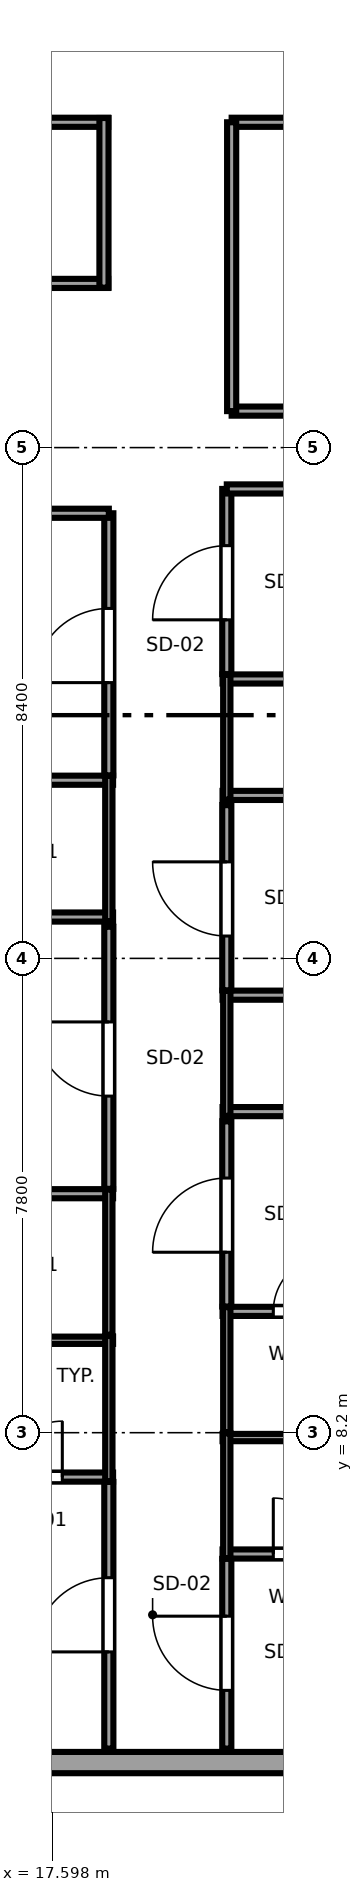
"""IFC4 building model, lengths in metres.
Left out: names, types, materials, properties, quantities, classifications, styles, units other than length and angle.
Written with IfcOpenShell. Run it as: python <this file> out.ifc"""

import sys

from ifc_helpers import new_model, si_unit, direction, frame, frame_2d, origin, place, context, subcontext, project, spatial, rectangle, extrude, source, transform, mapped, element, fill, save


model = new_model("IFC4")
c1 = context("Model", 3, precision=1e-05, world=origin(), true_north=direction((0.0, 1.0)))
c2 = subcontext(c1, "Body", "Model", "MODEL_VIEW")
j1 = project(units=[si_unit("LENGTHUNIT", "METRE"), si_unit("PLANEANGLEUNIT", "RADIAN")], contexts=[c1])
p1 = place(None, origin())
s1 = spatial("IfcSite", under=j1, at=p1, CompositionType="ELEMENT")
p2 = place(p1, origin())
s2 = spatial("IfcBuilding", under=s1, at=p2, CompositionType="ELEMENT")
p3 = place(p2, frame((0.0, 0.0, 238.1)))
s3 = spatial("IfcBuildingStorey", under=s2, at=p3, CompositionType="ELEMENT", Elevation=238.1)
p4 = place(p3, frame((7.017, 2.775, 0.0), z_axis=(0.0, 0.0, 1.0), x_axis=(1.0, 0.0, 0.0)))
e1 = element("IfcWall", 1, at=p4, inside=s3, PredefinedType="SOLIDWALL", context=c2, shape_type="SweptSolid", body=[
    extrude(rectangle(XDim=28.366, YDim=0.35, at=frame_2d((14.183, 0.0))), origin(), (0.0, 0.0, 1.0), 3.29),
])
p5 = place(p4, frame((1.514, 0.0, 0.68)))
e2 = element("IfcOpeningElement", 2, at=p5, cuts=e1, PredefinedType="OPENING", context=c2, shape_type="SweptSolid", body=[
    extrude(rectangle(XDim=2.7, YDim=1.95, at=frame_2d((1.35, 0.975))), frame((0.0, 0.185, 0.0), z_axis=(0.0, -1.0, 0.0), x_axis=(1.0, 0.0, 0.0)), (0.0, 0.0, 1.0), 0.37),
])
p6 = place(p4, frame((15.647, 0.0, 0.68)))
e3 = element("IfcOpeningElement", 3, at=p6, cuts=e1, PredefinedType="OPENING", context=c2, shape_type="SweptSolid", body=[
    extrude(rectangle(XDim=2.7, YDim=1.95, at=frame_2d((1.35, 0.975))), frame((0.0, 0.185, 0.0), z_axis=(0.0, -1.0, 0.0), x_axis=(1.0, 0.0, 0.0)), (0.0, 0.0, 1.0), 0.37),
])
p7 = place(p4, frame((24.152, 0.0, 0.68)))
e4 = element("IfcOpeningElement", 4, at=p7, cuts=e1, PredefinedType="OPENING", context=c2, shape_type="SweptSolid", body=[
    extrude(rectangle(XDim=2.7, YDim=1.95, at=frame_2d((1.35, 0.975))), frame((0.0, 0.185, 0.0), z_axis=(0.0, -1.0, 0.0), x_axis=(1.0, 0.0, 0.0)), (0.0, 0.0, 1.0), 0.37),
])
p8 = place(p3, frame((16.01, 7.47, 0.0), z_axis=(0.0, 0.0, 1.0), x_axis=(1.0, 0.0, 0.0)))
e5 = element("IfcWall", 5, at=p8, inside=s3, PredefinedType="PARTITIONING", context=c2, shape_type="SweptSolid", body=[
    extrude(rectangle(XDim=2.59, YDim=0.15, at=frame_2d((1.295, 0.0))), origin(), (0.0, 0.0, 1.0), 3.29),
])
p9 = place(p8, frame((0.835, 0.0, 0.0)))
e6 = element("IfcOpeningElement", 6, at=p9, cuts=e5, PredefinedType="OPENING", context=c2, shape_type="SweptSolid", body=[
    extrude(rectangle(XDim=0.92, YDim=2.01, at=frame_2d((0.46, 1.005))), frame((0.0, 0.085, 0.0), z_axis=(0.0, -1.0, 0.0), x_axis=(1.0, 0.0, 0.0)), (0.0, 0.0, 1.0), 0.17),
])
p10 = place(p3, frame((16.01, 9.72, 0.0), z_axis=(0.0, 0.0, 1.0), x_axis=(1.0, 0.0, 0.0)))
e7 = element("IfcWall", 7, at=p10, inside=s3, PredefinedType="PLUMBINGWALL", context=c2, shape_type="SweptSolid", body=[
    extrude(rectangle(XDim=2.59, YDim=0.12, at=frame_2d((1.295, 0.0))), origin(), (0.0, 0.0, 1.0), 3.29),
])
p11 = place(p3, frame((18.53, 7.4, 0.0), z_axis=(0.0, 0.0, 1.0), x_axis=(0.0, 1.0, 0.0)))
e8 = element("IfcWall", 8, at=p11, inside=s3, PredefinedType="PLUMBINGWALL", context=c2, shape_type="SweptSolid", body=[
    extrude(rectangle(XDim=2.39, YDim=0.12, at=frame_2d((1.195, 0.0))), origin(), (0.0, 0.0, 1.0), 3.29),
])
p12 = place(p3, frame((16.01, 12.13, 0.0), z_axis=(0.0, 0.0, 1.0), x_axis=(1.0, 0.0, 0.0)))
e9 = element("IfcWall", 9, at=p12, inside=s3, PredefinedType="PARTITIONING", context=c2, shape_type="SweptSolid", body=[
    extrude(rectangle(XDim=2.59, YDim=0.15, at=frame_2d((1.295, 0.0))), origin(), (0.0, 0.0, 1.0), 3.29),
])
p13 = place(p3, frame((18.53, 9.81, 0.0), z_axis=(0.0, 0.0, 1.0), x_axis=(0.0, 1.0, 0.0)))
e10 = element("IfcWall", 10, at=p13, inside=s3, PredefinedType="PLUMBINGWALL", context=c2, shape_type="SweptSolid", body=[
    extrude(rectangle(XDim=2.39, YDim=0.12, at=frame_2d((1.195, 0.0))), origin(), (0.0, 0.0, 1.0), 3.29),
])
p14 = place(p3, frame((3.005, 16.68, 0.0), z_axis=(0.0, 0.0, 1.0), x_axis=(1.0, 0.0, 0.0)))
e11 = element("IfcWall", 11, at=p14, inside=s3, PredefinedType="PARTITIONING", context=c2, shape_type="SweptSolid", body=[
    extrude(rectangle(XDim=15.595, YDim=0.15, at=frame_2d((7.798, 0.0))), origin(), (0.0, 0.0, 1.0), 3.29),
])
p15 = place(p3, frame((16.01, 18.93, 0.0), z_axis=(0.0, 0.0, 1.0), x_axis=(1.0, 0.0, 0.0)))
e12 = element("IfcWall", 12, at=p15, inside=s3, PredefinedType="PARTITIONING", context=c2, shape_type="SweptSolid", body=[
    extrude(rectangle(XDim=2.59, YDim=0.15, at=frame_2d((1.295, 0.0))), origin(), (0.0, 0.0, 1.0), 3.29),
])
p16 = place(p3, frame((18.53, 16.61, 0.0), z_axis=(0.0, 0.0, 1.0), x_axis=(0.0, 1.0, 0.0)))
e13 = element("IfcWall", 13, at=p16, inside=s3, PredefinedType="PLUMBINGWALL", context=c2, shape_type="SweptSolid", body=[
    extrude(rectangle(XDim=2.39, YDim=0.12, at=frame_2d((1.195, 0.0))), origin(), (0.0, 0.0, 1.0), 3.29),
])
p17 = place(p3, frame((20.4, 6.205, 0.0), z_axis=(0.0, 0.0, 1.0), x_axis=(1.0, 0.0, 0.0)))
e14 = element("IfcWall", 14, at=p17, inside=s3, PredefinedType="PARTITIONING", context=c2, shape_type="SweptSolid", body=[
    extrude(rectangle(XDim=2.59, YDim=0.15, at=frame_2d((1.295, 0.0))), origin(), (0.0, 0.0, 1.0), 3.29),
])
p18 = place(p17, frame((0.835, 0.0, 0.0)))
e15 = element("IfcOpeningElement", 15, at=p18, cuts=e14, PredefinedType="OPENING", context=c2, shape_type="SweptSolid", body=[
    extrude(rectangle(XDim=0.92, YDim=2.01, at=frame_2d((0.46, 1.005))), frame((0.0, 0.085, 0.0), z_axis=(0.0, -1.0, 0.0), x_axis=(1.0, 0.0, 0.0)), (0.0, 0.0, 1.0), 0.17),
])
p19 = place(p3, frame((20.4, 8.12, 0.0), z_axis=(0.0, 0.0, 1.0), x_axis=(1.0, 0.0, 0.0)))
e16 = element("IfcWall", 16, at=p19, inside=s3, PredefinedType="PLUMBINGWALL", context=c2, shape_type="SweptSolid", body=[
    extrude(rectangle(XDim=2.59, YDim=0.12, at=frame_2d((1.295, 0.0))), origin(), (0.0, 0.0, 1.0), 3.29),
])
p20 = place(p3, frame((20.47, 6.135, 0.0), z_axis=(0.0, 0.0, 1.0), x_axis=(0.0, 1.0, 0.0)))
e17 = element("IfcWall", 17, at=p20, inside=s3, PredefinedType="PLUMBINGWALL", context=c2, shape_type="SweptSolid", body=[
    extrude(rectangle(XDim=2.055, YDim=0.12, at=frame_2d((1.027, 0.0))), origin(), (0.0, 0.0, 1.0), 3.29),
])
p21 = place(p3, frame((20.4, 10.195, 0.0), z_axis=(0.0, 0.0, 1.0), x_axis=(1.0, 0.0, 0.0)))
e18 = element("IfcWall", 18, at=p21, inside=s3, PredefinedType="PARTITIONING", context=c2, shape_type="SweptSolid", body=[
    extrude(rectangle(XDim=2.59, YDim=0.15, at=frame_2d((1.295, 0.0))), origin(), (0.0, 0.0, 1.0), 3.29),
])
p22 = place(p21, frame((0.835, 0.0, 0.0)))
e19 = element("IfcOpeningElement", 19, at=p22, cuts=e18, PredefinedType="OPENING", context=c2, shape_type="SweptSolid", body=[
    extrude(rectangle(XDim=0.92, YDim=2.01, at=frame_2d((0.46, 1.005))), frame((0.0, 0.085, 0.0), z_axis=(0.0, -1.0, 0.0), x_axis=(1.0, 0.0, 0.0)), (0.0, 0.0, 1.0), 0.17),
])
p23 = place(p3, frame((20.47, 8.21, 0.0), z_axis=(0.0, 0.0, 1.0), x_axis=(0.0, 1.0, 0.0)))
e20 = element("IfcWall", 20, at=p23, inside=s3, PredefinedType="PLUMBINGWALL", context=c2, shape_type="SweptSolid", body=[
    extrude(rectangle(XDim=2.055, YDim=0.12, at=frame_2d((1.027, 0.0))), origin(), (0.0, 0.0, 1.0), 3.29),
])
p24 = place(p3, frame((20.4, 13.48, 0.0), z_axis=(0.0, 0.0, 1.0), x_axis=(1.0, 0.0, 0.0)))
e21 = element("IfcWall", 21, at=p24, inside=s3, PredefinedType="PARTITIONING", context=c2, shape_type="SweptSolid", body=[
    extrude(rectangle(XDim=18.995, YDim=0.15, at=frame_2d((9.498, 0.0))), origin(), (0.0, 0.0, 1.0), 3.29),
])
p25 = place(p3, frame((20.4, 15.395, 0.0), z_axis=(0.0, 0.0, 1.0), x_axis=(1.0, 0.0, 0.0)))
e22 = element("IfcWall", 22, at=p25, inside=s3, PredefinedType="PARTITIONING", context=c2, shape_type="SweptSolid", body=[
    extrude(rectangle(XDim=2.59, YDim=0.15, at=frame_2d((1.295, 0.0))), origin(), (0.0, 0.0, 1.0), 3.29),
])
p26 = place(p3, frame((20.47, 13.41, 0.0), z_axis=(0.0, 0.0, 1.0), x_axis=(0.0, 1.0, 0.0)))
e23 = element("IfcWall", 23, at=p26, inside=s3, PredefinedType="PLUMBINGWALL", context=c2, shape_type="SweptSolid", body=[
    extrude(rectangle(XDim=2.055, YDim=0.12, at=frame_2d((1.028, 0.0))), origin(), (0.0, 0.0, 1.0), 3.29),
])
p27 = place(p3, frame((20.4, 18.68, 0.0), z_axis=(0.0, 0.0, 1.0), x_axis=(1.0, 0.0, 0.0)))
e24 = element("IfcWall", 24, at=p27, inside=s3, PredefinedType="PARTITIONING", context=c2, shape_type="SweptSolid", body=[
    extrude(rectangle(XDim=18.995, YDim=0.15, at=frame_2d((9.498, 0.0))), origin(), (0.0, 0.0, 1.0), 3.29),
])
p28 = place(p3, frame((20.4, 20.595, 0.0), z_axis=(0.0, 0.0, 1.0), x_axis=(1.0, 0.0, 0.0)))
e25 = element("IfcWall", 25, at=p28, inside=s3, PredefinedType="PARTITIONING", context=c2, shape_type="SweptSolid", body=[
    extrude(rectangle(XDim=2.59, YDim=0.15, at=frame_2d((1.295, 0.0))), origin(), (0.0, 0.0, 1.0), 3.29),
])
p29 = place(p3, frame((20.47, 18.61, 0.0), z_axis=(0.0, 0.0, 1.0), x_axis=(0.0, 1.0, 0.0)))
e26 = element("IfcWall", 26, at=p29, inside=s3, PredefinedType="PLUMBINGWALL", context=c2, shape_type="SweptSolid", body=[
    extrude(rectangle(XDim=2.055, YDim=0.12, at=frame_2d((1.027, 0.0))), origin(), (0.0, 0.0, 1.0), 3.29),
])
p30 = place(p3, frame((18.53, 3.005, 0.0), z_axis=(0.0, 0.0, 1.0), x_axis=(0.0, 1.0, 0.0)))
e27 = element("IfcWall", 27, at=p30, inside=s3, PredefinedType="PARTITIONING", context=c2, shape_type="SweptSolid", body=[
    extrude(rectangle(XDim=4.385, YDim=0.15, at=frame_2d((2.192, 0.0))), origin(), (0.0, 0.0, 1.0), 3.29),
])
p31 = place(p30, frame((1.59, 0.0, 0.0)))
e28 = element("IfcOpeningElement", 28, at=p31, cuts=e27, PredefinedType="OPENING", context=c2, shape_type="SweptSolid", body=[
    extrude(rectangle(XDim=1.22, YDim=2.08, at=frame_2d((0.61, 1.04))), frame((0.0, 0.085, 0.0), z_axis=(0.0, -1.0, 0.0), x_axis=(1.0, 0.0, 0.0)), (0.0, 0.0, 1.0), 0.17),
])
p32 = place(p3, frame((18.53, 12.21, 0.0), z_axis=(0.0, 0.0, 1.0), x_axis=(0.0, 1.0, 0.0)))
e29 = element("IfcWall", 29, at=p32, inside=s3, PredefinedType="PARTITIONING", context=c2, shape_type="SweptSolid", body=[
    extrude(rectangle(XDim=4.31, YDim=0.15, at=frame_2d((2.155, 0.0))), origin(), (0.0, 0.0, 1.0), 3.29),
])
p33 = place(p32, frame((1.525, 0.0, 0.0)))
e30 = element("IfcOpeningElement", 30, at=p33, cuts=e29, PredefinedType="OPENING", context=c2, shape_type="SweptSolid", body=[
    extrude(rectangle(XDim=1.22, YDim=2.08, at=frame_2d((0.61, 1.04))), frame((0.0, 0.085, 0.0), z_axis=(0.0, -1.0, 0.0), x_axis=(1.0, 0.0, 0.0)), (0.0, 0.0, 1.0), 0.17),
])
p34 = place(p3, frame((18.53, 19.01, 0.0), z_axis=(0.0, 0.0, 1.0), x_axis=(0.0, 1.0, 0.0)))
e31 = element("IfcWall", 31, at=p34, inside=s3, PredefinedType="PARTITIONING", context=c2, shape_type="SweptSolid", body=[
    extrude(rectangle(XDim=4.31, YDim=0.15, at=frame_2d((2.155, 0.0))), origin(), (0.0, 0.0, 1.0), 3.29),
])
p35 = place(p34, frame((1.525, 0.0, 0.0)))
e32 = element("IfcOpeningElement", 32, at=p35, cuts=e31, PredefinedType="OPENING", context=c2, shape_type="SweptSolid", body=[
    extrude(rectangle(XDim=1.22, YDim=2.08, at=frame_2d((0.61, 1.04))), frame((0.0, 0.085, 0.0), z_axis=(0.0, -1.0, 0.0), x_axis=(1.0, 0.0, 0.0)), (0.0, 0.0, 1.0), 0.17),
])
p36 = place(p3, frame((3.005, 23.32, 0.0), z_axis=(0.0, 0.0, 1.0), x_axis=(1.0, 0.0, 0.0)))
e33 = element("IfcWall", 33, at=p36, inside=s3, PredefinedType="PARTITIONING", context=c2, shape_type="SweptSolid", body=[
    extrude(rectangle(XDim=15.525, YDim=0.15, at=frame_2d((7.763, 0.0))), origin(), (0.0, 0.0, 1.0), 3.29),
])
p37 = place(p3, frame((20.47, 3.005, 0.0), z_axis=(0.0, 0.0, 1.0), x_axis=(0.0, 1.0, 0.0)))
e34 = element("IfcWall", 34, at=p37, inside=s3, PredefinedType="PARTITIONING", context=c2, shape_type="SweptSolid", body=[
    extrude(rectangle(XDim=3.12, YDim=0.15, at=frame_2d((1.56, 0.0))), origin(), (0.0, 0.0, 1.0), 3.29),
])
p38 = place(p37, frame((0.958, 0.0, 0.0)))
e35 = element("IfcOpeningElement", 35, at=p38, cuts=e34, PredefinedType="OPENING", context=c2, shape_type="SweptSolid", body=[
    extrude(rectangle(XDim=1.22, YDim=2.08, at=frame_2d((0.61, 1.04))), frame((0.0, 0.085, 0.0), z_axis=(0.0, -1.0, 0.0), x_axis=(1.0, 0.0, 0.0)), (0.0, 0.0, 1.0), 0.17),
])
p39 = place(p3, frame((20.47, 10.275, 0.0), z_axis=(0.0, 0.0, 1.0), x_axis=(0.0, 1.0, 0.0)))
e36 = element("IfcWall", 36, at=p39, inside=s3, PredefinedType="PARTITIONING", context=c2, shape_type="SweptSolid", body=[
    extrude(rectangle(XDim=3.045, YDim=0.15, at=frame_2d((1.522, 0.0))), origin(), (0.0, 0.0, 1.0), 3.29),
])
p40 = place(p39, frame((0.893, 0.0, 0.0)))
e37 = element("IfcOpeningElement", 37, at=p40, cuts=e36, PredefinedType="OPENING", context=c2, shape_type="SweptSolid", body=[
    extrude(rectangle(XDim=1.22, YDim=2.08, at=frame_2d((0.61, 1.04))), frame((0.0, 0.085, 0.0), z_axis=(0.0, -1.0, 0.0), x_axis=(1.0, 0.0, 0.0)), (0.0, 0.0, 1.0), 0.17),
])
p41 = place(p3, frame((20.47, 15.475, 0.0), z_axis=(0.0, 0.0, 1.0), x_axis=(0.0, 1.0, 0.0)))
e38 = element("IfcWall", 38, at=p41, inside=s3, PredefinedType="PARTITIONING", context=c2, shape_type="SweptSolid", body=[
    extrude(rectangle(XDim=3.045, YDim=0.15, at=frame_2d((1.522, 0.0))), origin(), (0.0, 0.0, 1.0), 3.29),
])
p42 = place(p41, frame((0.893, 0.0, 0.0)))
e39 = element("IfcOpeningElement", 39, at=p42, cuts=e38, PredefinedType="OPENING", context=c2, shape_type="SweptSolid", body=[
    extrude(rectangle(XDim=1.22, YDim=2.08, at=frame_2d((0.61, 1.04))), frame((0.0, 0.085, 0.0), z_axis=(0.0, -1.0, 0.0), x_axis=(1.0, 0.0, 0.0)), (0.0, 0.0, 1.0), 0.17),
])
p43 = place(p3, frame((20.47, 20.675, 0.0), z_axis=(0.0, 0.0, 1.0), x_axis=(0.0, 1.0, 0.0)))
e40 = element("IfcWall", 40, at=p43, inside=s3, PredefinedType="PARTITIONING", context=c2, shape_type="SweptSolid", body=[
    extrude(rectangle(XDim=3.045, YDim=0.15, at=frame_2d((1.522, 0.0))), origin(), (0.0, 0.0, 1.0), 3.29),
])
p44 = place(p43, frame((0.893, 0.0, 0.0)))
e41 = element("IfcOpeningElement", 41, at=p44, cuts=e40, PredefinedType="OPENING", context=c2, shape_type="SweptSolid", body=[
    extrude(rectangle(XDim=1.22, YDim=2.08, at=frame_2d((0.61, 1.04))), frame((0.0, 0.085, 0.0), z_axis=(0.0, -1.0, 0.0), x_axis=(1.0, 0.0, 0.0)), (0.0, 0.0, 1.0), 0.17),
])
p45 = place(p3, frame((20.47, 23.72, 0.0), z_axis=(0.0, 0.0, 1.0), x_axis=(1.0, 0.0, 0.0)))
e42 = element("IfcWall", 42, at=p45, inside=s3, PredefinedType="PARTITIONING", context=c2, shape_type="SweptSolid", body=[
    extrude(rectangle(XDim=18.925, YDim=0.15, at=frame_2d((9.462, 0.0))), origin(), (0.0, 0.0, 1.0), 3.29),
])
p46 = place(p3, frame((9.93, 27.1, 0.0), z_axis=(0.0, 0.0, 1.0), x_axis=(1.0, 0.0, 0.0)))
e43 = element("IfcWall", 43, at=p46, inside=s3, PredefinedType="PARTITIONING", context=c2, shape_type="SweptSolid", body=[
    extrude(rectangle(XDim=8.59, YDim=0.15, at=frame_2d((4.295, 0.0))), origin(), (0.0, 0.0, 1.0), 3.29),
])
p47 = place(p3, frame((9.93, 29.75, 0.0), z_axis=(0.0, 0.0, 1.0), x_axis=(1.0, 0.0, 0.0)))
e44 = element("IfcWall", 44, at=p47, inside=s3, PredefinedType="PARTITIONING", context=c2, shape_type="SweptSolid", body=[
    extrude(rectangle(XDim=8.59, YDim=0.15, at=frame_2d((4.295, 0.0))), origin(), (0.0, 0.0, 1.0), 3.29),
])
p48 = place(p47, frame((3.835, 0.0, 0.0)))
e45 = element("IfcOpeningElement", 45, at=p48, cuts=e44, PredefinedType="OPENING", context=c2, shape_type="SweptSolid", body=[
    extrude(rectangle(XDim=0.92, YDim=2.01, at=frame_2d((0.46, 1.005))), frame((0.0, 0.085, 0.0), z_axis=(0.0, -1.0, 0.0), x_axis=(1.0, 0.0, 0.0)), (0.0, 0.0, 1.0), 0.17),
])
p49 = place(p3, frame((18.45, 27.03, 0.0), z_axis=(0.0, 0.0, 1.0), x_axis=(0.0, 1.0, 0.0)))
e46 = element("IfcWall", 46, at=p49, inside=s3, PredefinedType="PARTITIONING", context=c2, shape_type="SweptSolid", body=[
    extrude(rectangle(XDim=2.79, YDim=0.15, at=frame_2d((1.395, 0.0))), origin(), (0.0, 0.0, 1.0), 3.29),
])
p50 = place(p3, frame((20.55, 25.0, 0.0), z_axis=(0.0, 0.0, 1.0), x_axis=(1.0, 0.0, 0.0)))
e47 = element("IfcWall", 47, at=p50, inside=s3, PredefinedType="PARTITIONING", context=c2, shape_type="SweptSolid", body=[
    extrude(rectangle(XDim=7.85, YDim=0.15, at=frame_2d((3.925, 0.0))), origin(), (0.0, 0.0, 1.0), 3.29),
])
p51 = place(p3, frame((20.55, 29.75, 0.0), z_axis=(0.0, 0.0, 1.0), x_axis=(1.0, 0.0, 0.0)))
e48 = element("IfcWall", 48, at=p51, inside=s3, PredefinedType="PARTITIONING", context=c2, shape_type="SweptSolid", body=[
    extrude(rectangle(XDim=7.85, YDim=0.15, at=frame_2d((3.925, 0.0))), origin(), (0.0, 0.0, 1.0), 3.29),
])
p52 = place(p51, frame((3.1, 0.0, 0.0)))
e49 = element("IfcOpeningElement", 49, at=p52, cuts=e48, PredefinedType="OPENING", context=c2, shape_type="SweptSolid", body=[
    extrude(rectangle(XDim=1.65, YDim=2.15, at=frame_2d((0.825, 1.075))), frame((0.0, 0.085, 0.0), z_axis=(0.0, -1.0, 0.0), x_axis=(1.0, 0.0, 0.0)), (0.0, 0.0, 1.0), 0.17),
])
p53 = place(p3, frame((20.55, 25.0, 0.0), z_axis=(0.0, 0.0, 1.0), x_axis=(0.0, 1.0, 0.0)))
e50 = element("IfcWall", 50, at=p53, inside=s3, PredefinedType="PARTITIONING", context=c2, shape_type="SweptSolid", body=[
    extrude(rectangle(XDim=4.75, YDim=0.15, at=frame_2d((2.375, 0.0))), origin(), (0.0, 0.0, 1.0), 3.29),
])
m1 = source(origin(), c2, "Body", "SweptSolid", [
    extrude(rectangle(XDim=0.92, YDim=2.01, at=frame_2d((0.46, 1.005))), frame((0.0, 0.025, 0.0), z_axis=(0.0, -1.0, 0.0), x_axis=(1.0, 0.0, 0.0)), (0.0, 0.0, 1.0), 0.05),
])
p54 = place(p9, origin())
e51 = element("IfcDoor", 51, at=p54, inside=s3, OperationType="SINGLE_SWING_RIGHT", PredefinedType="DOOR", context=c2, shape_type="MappedRepresentation", body=[
    mapped(m1, transform((0.0, 0.0, 0.0), x_axis=(1.0, 0.0, 0.0), y_axis=(0.0, 1.0, 0.0), z_axis=(0.0, 0.0, 1.0), scale=1.0)),
])
fill(e6, e51)
p55 = place(p18, origin())
e52 = element("IfcDoor", 52, at=p55, inside=s3, OperationType="SINGLE_SWING_LEFT", PredefinedType="DOOR", context=c2, shape_type="MappedRepresentation", body=[
    mapped(m1, transform((0.0, 0.0, 0.0), x_axis=(1.0, 0.0, 0.0), y_axis=(0.0, 1.0, 0.0), z_axis=(0.0, 0.0, 1.0), scale=1.0)),
])
fill(e15, e52)
p56 = place(p22, origin())
e53 = element("IfcDoor", 53, at=p56, inside=s3, OperationType="SINGLE_SWING_RIGHT", PredefinedType="DOOR", context=c2, shape_type="MappedRepresentation", body=[
    mapped(m1, transform((0.0, 0.0, 0.0), x_axis=(1.0, 0.0, 0.0), y_axis=(0.0, 1.0, 0.0), z_axis=(0.0, 0.0, 1.0), scale=1.0)),
])
fill(e19, e53)
m2 = source(origin(), c2, "Body", "SweptSolid", [
    extrude(rectangle(XDim=1.22, YDim=2.08, at=frame_2d((0.61, 1.04))), frame((0.0, 0.025, 0.0), z_axis=(0.0, -1.0, 0.0), x_axis=(1.0, 0.0, 0.0)), (0.0, 0.0, 1.0), 0.05),
])
p57 = place(p31, origin())
e54 = element("IfcDoor", 54, at=p57, inside=s3, OperationType="SINGLE_SWING_LEFT", PredefinedType="DOOR", context=c2, shape_type="MappedRepresentation", body=[
    mapped(m2, transform((0.0, 0.0, 0.0), x_axis=(1.0, 0.0, 0.0), y_axis=(0.0, 1.0, 0.0), z_axis=(0.0, 0.0, 1.0), scale=1.0)),
])
fill(e28, e54)
p58 = place(p33, origin())
e55 = element("IfcDoor", 55, at=p58, inside=s3, OperationType="SINGLE_SWING_RIGHT", PredefinedType="DOOR", context=c2, shape_type="MappedRepresentation", body=[
    mapped(m2, transform((0.0, 0.0, 0.0), x_axis=(1.0, 0.0, 0.0), y_axis=(0.0, 1.0, 0.0), z_axis=(0.0, 0.0, 1.0), scale=1.0)),
])
fill(e30, e55)
p59 = place(p35, origin())
e56 = element("IfcDoor", 56, at=p59, inside=s3, OperationType="SINGLE_SWING_LEFT", PredefinedType="DOOR", context=c2, shape_type="MappedRepresentation", body=[
    mapped(m2, transform((0.0, 0.0, 0.0), x_axis=(1.0, 0.0, 0.0), y_axis=(0.0, 1.0, 0.0), z_axis=(0.0, 0.0, 1.0), scale=1.0)),
])
fill(e32, e56)
p60 = place(p38, origin())
e57 = element("IfcDoor", 57, at=p60, inside=s3, OperationType="SINGLE_SWING_RIGHT", PredefinedType="DOOR", context=c2, shape_type="MappedRepresentation", body=[
    mapped(m2, transform((0.0, 0.0, 0.0), x_axis=(1.0, 0.0, 0.0), y_axis=(0.0, 1.0, 0.0), z_axis=(0.0, 0.0, 1.0), scale=1.0)),
])
fill(e35, e57)
p61 = place(p40, origin())
e58 = element("IfcDoor", 58, at=p61, inside=s3, OperationType="SINGLE_SWING_LEFT", PredefinedType="DOOR", context=c2, shape_type="MappedRepresentation", body=[
    mapped(m2, transform((0.0, 0.0, 0.0), x_axis=(1.0, 0.0, 0.0), y_axis=(0.0, 1.0, 0.0), z_axis=(0.0, 0.0, 1.0), scale=1.0)),
])
fill(e37, e58)
p62 = place(p42, origin())
e59 = element("IfcDoor", 59, at=p62, inside=s3, OperationType="SINGLE_SWING_RIGHT", PredefinedType="DOOR", context=c2, shape_type="MappedRepresentation", body=[
    mapped(m2, transform((0.0, 0.0, 0.0), x_axis=(1.0, 0.0, 0.0), y_axis=(0.0, 1.0, 0.0), z_axis=(0.0, 0.0, 1.0), scale=1.0)),
])
fill(e39, e59)
p63 = place(p44, origin())
e60 = element("IfcDoor", 60, at=p63, inside=s3, OperationType="SINGLE_SWING_LEFT", PredefinedType="DOOR", context=c2, shape_type="MappedRepresentation", body=[
    mapped(m2, transform((0.0, 0.0, 0.0), x_axis=(1.0, 0.0, 0.0), y_axis=(0.0, 1.0, 0.0), z_axis=(0.0, 0.0, 1.0), scale=1.0)),
])
fill(e41, e60)
save(model, sys.argv[1])
